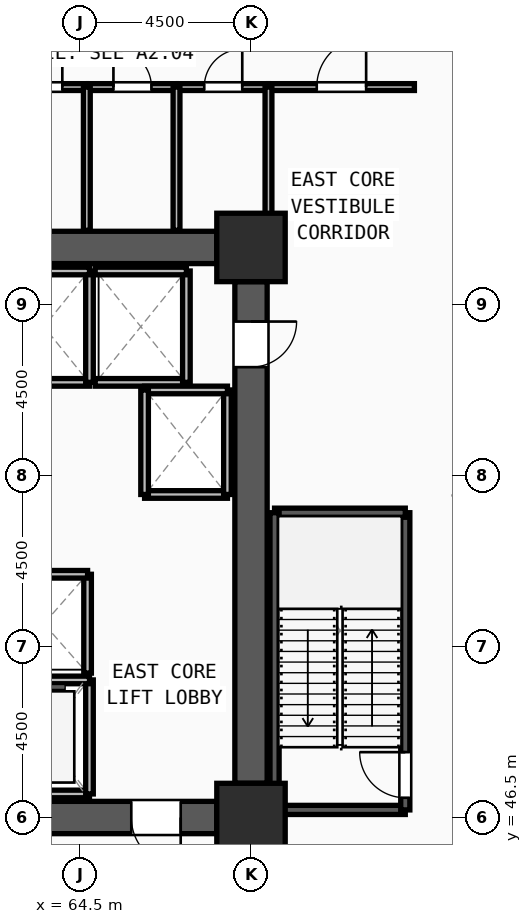
"""IFC4 building model, lengths in metres.
Left out: names, types, materials, properties, quantities, classifications, styles, units other than length and angle.
Written with IfcOpenShell. Run it as: python <this file> out.ifc"""

import sys

from ifc_helpers import new_model, si_unit, direction, frame, frame_2d, origin, origin_2d, place, context, subcontext, project, spatial, rectangle, extrude, source, transform, mapped, element, fill, save


model = new_model("IFC4")
c1 = context("Model", 3, precision=1e-05, world=origin(), true_north=direction((0.0, 1.0)))
c2 = subcontext(c1, "Body", "Model", "MODEL_VIEW")
j1 = project(units=[si_unit("LENGTHUNIT", "METRE"), si_unit("PLANEANGLEUNIT", "RADIAN")], contexts=[c1])
p1 = place(None, origin())
s1 = spatial("IfcSite", under=j1, at=p1, CompositionType="ELEMENT")
p2 = place(p1, origin())
s2 = spatial("IfcBuilding", under=s1, at=p2, CompositionType="ELEMENT")
p3 = place(p2, frame((0.0, 0.0, 9.9)))
s3 = spatial("IfcBuildingStorey", under=s2, at=p3, CompositionType="ELEMENT", Elevation=9.9)
m1 = source(origin(), c2, "Body", "SweptSolid", [
    extrude(rectangle(XDim=1.8, YDim=1.8, at=origin_2d()), origin(), (0.0, 0.0, 1.0), 4.5),
])
for number, where, z_axis, x_axis in (
    (1, (69.0, 46.5, 0.0), (0.0, 0.0, 1.0), (1.0, 0.0, 0.0)),
    (2, (69.0, 61.5, 0.0), (0.0, 0.0, 1.0), (1.0, 0.0, 0.0)),
):
    element("IfcColumn", number, at=place(p3, frame(where, z_axis=z_axis, x_axis=x_axis)), inside=s3, PredefinedType="COLUMN", context=c2, shape_type="MappedRepresentation", body=[
        mapped(m1, transform((0.0, 0.0, 0.0), x_axis=(1.0, 0.0, 0.0), y_axis=(0.0, 1.0, 0.0), z_axis=(0.0, 0.0, 1.0), scale=1.0)),
    ])
p4 = place(p3, frame((60.9, 61.5, 0.0), z_axis=(0.0, 0.0, 1.0), x_axis=(1.0, 0.0, 0.0)))
e3 = element("IfcWall", 3, at=p4, inside=s3, PredefinedType="SHEAR", context=c2, shape_type="SweptSolid", body=[
    extrude(rectangle(XDim=7.2, YDim=0.85, at=frame_2d((3.6, 0.0))), origin(), (0.0, 0.0, 1.0), 4.25),
])
p5 = place(p3, frame((69.0, 60.6, 0.0), z_axis=(0.0, 0.0, 1.0), x_axis=(0.0, -1.0, 0.0)))
e4 = element("IfcWall", 4, at=p5, inside=s3, PredefinedType="SHEAR", context=c2, shape_type="SweptSolid", body=[
    extrude(rectangle(XDim=13.2, YDim=0.85, at=frame_2d((6.6, 0.0))), origin(), (0.0, 0.0, 1.0), 4.25),
])
m2 = source(origin(), c2, "Body", "SweptSolid", [
    extrude(rectangle(XDim=1.2, YDim=2.2, at=frame_2d((0.6, 1.1))), frame((0.0, 0.435, 0.0), z_axis=(0.0, -1.0, 0.0), x_axis=(1.0, 0.0, 0.0)), (0.0, 0.0, 1.0), 0.87),
])
p6 = place(p5, frame((1.05, 0.0, 0.0)))
e5 = element("IfcOpeningElement", 5, at=p6, cuts=e4, PredefinedType="OPENING", context=c2, shape_type="MappedRepresentation", body=[
    mapped(m2, transform((0.0, 0.0, 0.0), x_axis=(1.0, 0.0, 0.0), y_axis=(0.0, 1.0, 0.0), z_axis=(0.0, 0.0, 1.0), scale=1.0)),
])
p7 = place(p3, frame((68.1, 46.5, 0.0), z_axis=(0.0, 0.0, 1.0), x_axis=(-1.0, 0.0, 0.0)))
e6 = element("IfcWall", 6, at=p7, inside=s3, PredefinedType="SHEAR", context=c2, shape_type="SweptSolid", body=[
    extrude(rectangle(XDim=7.2, YDim=0.85, at=frame_2d((3.6, 0.0))), origin(), (0.0, 0.0, 1.0), 4.25),
])
m3 = source(origin(), c2, "Body", "SweptSolid", [
    extrude(rectangle(XDim=1.3, YDim=2.2, at=frame_2d((0.65, 1.1))), frame((0.0, 0.435, 0.0), z_axis=(0.0, -1.0, 0.0), x_axis=(1.0, 0.0, 0.0)), (0.0, 0.0, 1.0), 0.87),
])
p8 = place(p7, frame((0.95, 0.0, 0.0)))
e7 = element("IfcOpeningElement", 7, at=p8, cuts=e6, PredefinedType="OPENING", context=c2, shape_type="MappedRepresentation", body=[
    mapped(m3, transform((0.0, 0.0, 0.0), x_axis=(1.0, 0.0, 0.0), y_axis=(0.0, 1.0, 0.0), z_axis=(0.0, 0.0, 1.0), scale=1.0)),
])
p9 = place(p3, frame((69.62, 46.7, 0.0), z_axis=(0.0, 0.0, 1.0), x_axis=(1.0, 0.0, 0.0)))
e8 = element("IfcWall", 8, at=p9, inside=s3, PredefinedType="SOLIDWALL", context=c2, shape_type="SweptSolid", body=[
    extrude(rectangle(XDim=3.44, YDim=0.24, at=frame_2d((1.72, 0.0))), origin(), (0.0, 0.0, 1.0), 4.25),
])
p10 = place(p3, frame((73.06, 46.7, 0.0), z_axis=(0.0, 0.0, 1.0), x_axis=(0.0, 1.0, 0.0)))
e9 = element("IfcWall", 9, at=p10, inside=s3, PredefinedType="SOLIDWALL", context=c2, shape_type="SweptSolid", body=[
    extrude(rectangle(XDim=7.82, YDim=0.24, at=frame_2d((3.91, 0.0))), origin(), (0.0, 0.0, 1.0), 4.25),
])
m4 = source(origin(), c2, "Body", "SweptSolid", [
    extrude(rectangle(XDim=1.2, YDim=2.2, at=frame_2d((0.6, 1.1))), frame((0.0, 0.13, 0.0), z_axis=(0.0, -1.0, 0.0), x_axis=(1.0, 0.0, 0.0)), (0.0, 0.0, 1.0), 0.26),
])
p11 = place(p10, frame((0.32, 0.0, 0.0)))
e10 = element("IfcOpeningElement", 10, at=p11, cuts=e9, PredefinedType="OPENING", context=c2, shape_type="MappedRepresentation", body=[
    mapped(m4, transform((0.0, 0.0, 0.0), x_axis=(1.0, 0.0, 0.0), y_axis=(0.0, 1.0, 0.0), z_axis=(0.0, 0.0, 1.0), scale=1.0)),
])
p12 = place(p3, frame((73.06, 54.52, 0.0), z_axis=(0.0, 0.0, 1.0), x_axis=(-1.0, 0.0, 0.0)))
e11 = element("IfcWall", 11, at=p12, inside=s3, PredefinedType="SOLIDWALL", context=c2, shape_type="SweptSolid", body=[
    extrude(rectangle(XDim=3.44, YDim=0.24, at=frame_2d((1.72, 0.0))), origin(), (0.0, 0.0, 1.0), 4.25),
])
p13 = place(p3, frame((69.62, 54.52, 0.0), z_axis=(0.0, 0.0, 1.0), x_axis=(0.0, -1.0, 0.0)))
e12 = element("IfcWall", 12, at=p13, inside=s3, PredefinedType="SOLIDWALL", context=c2, shape_type="SweptSolid", body=[
    extrude(rectangle(XDim=7.82, YDim=0.24, at=frame_2d((3.91, 0.0))), origin(), (0.0, 0.0, 1.0), 4.25),
])
p14 = place(p3, frame((62.35, 47.12, 0.0), z_axis=(0.0, 0.0, 1.0), x_axis=(1.0, 0.0, 0.0)))
e13 = element("IfcWall", 13, at=p14, inside=s3, PredefinedType="SOLIDWALL", context=c2, shape_type="SweptSolid", body=[
    extrude(rectangle(XDim=2.4, YDim=0.2, at=frame_2d((1.2, 0.0))), origin(), (0.0, 0.0, 1.0), 4.25),
])
p15 = place(p3, frame((64.75, 47.12, 0.0), z_axis=(0.0, 0.0, 1.0), x_axis=(0.0, 1.0, 0.0)))
e14 = element("IfcWall", 14, at=p15, inside=s3, PredefinedType="SOLIDWALL", context=c2, shape_type="SweptSolid", body=[
    extrude(rectangle(XDim=3.0, YDim=0.2, at=frame_2d((1.5, 0.0))), origin(), (0.0, 0.0, 1.0), 4.25),
])
for number, where, z_axis, x_axis in (
    (15, (64.75, 50.12, 0.0), (0.0, 0.0, 1.0), (-1.0, 0.0, 0.0)),
    (16, (62.35, 57.95, 0.0), (0.0, 0.0, 1.0), (1.0, 0.0, 0.0)),
):
    element("IfcWall", number, at=place(p3, frame(where, z_axis=z_axis, x_axis=x_axis)), inside=s3, PredefinedType="SOLIDWALL", context=c2, shape_type="SweptSolid", body=[
        extrude(rectangle(XDim=2.4, YDim=0.2, at=frame_2d((1.2, 0.0))), origin(), (0.0, 0.0, 1.0), 4.25),
    ])
p16 = place(p3, frame((64.75, 57.95, 0.0), z_axis=(0.0, 0.0, 1.0), x_axis=(0.0, 1.0, 0.0)))
e17 = element("IfcWall", 17, at=p16, inside=s3, PredefinedType="SOLIDWALL", context=c2, shape_type="SweptSolid", body=[
    extrude(rectangle(XDim=2.93, YDim=0.2, at=frame_2d((1.465, 0.0))), origin(), (0.0, 0.0, 1.0), 4.25),
])
p17 = place(p3, frame((64.75, 60.88, 0.0), z_axis=(0.0, 0.0, 1.0), x_axis=(-1.0, 0.0, 0.0)))
e18 = element("IfcWall", 18, at=p17, inside=s3, PredefinedType="SOLIDWALL", context=c2, shape_type="SweptSolid", body=[
    extrude(rectangle(XDim=2.4, YDim=0.2, at=frame_2d((1.2, 0.0))), origin(), (0.0, 0.0, 1.0), 4.25),
])
p18 = place(p3, frame((64.9, 57.95, 0.0), z_axis=(0.0, 0.0, 1.0), x_axis=(1.0, 0.0, 0.0)))
e19 = element("IfcWall", 19, at=p18, inside=s3, PredefinedType="SOLIDWALL", context=c2, shape_type="SweptSolid", body=[
    extrude(rectangle(XDim=2.4, YDim=0.2, at=frame_2d((1.2, 0.0))), origin(), (0.0, 0.0, 1.0), 4.25),
])
p19 = place(p3, frame((67.3, 57.95, 0.0), z_axis=(0.0, 0.0, 1.0), x_axis=(0.0, 1.0, 0.0)))
e20 = element("IfcWall", 20, at=p19, inside=s3, PredefinedType="SOLIDWALL", context=c2, shape_type="SweptSolid", body=[
    extrude(rectangle(XDim=2.93, YDim=0.2, at=frame_2d((1.465, 0.0))), origin(), (0.0, 0.0, 1.0), 4.25),
])
p20 = place(p3, frame((67.3, 60.88, 0.0), z_axis=(0.0, 0.0, 1.0), x_axis=(-1.0, 0.0, 0.0)))
e21 = element("IfcWall", 21, at=p20, inside=s3, PredefinedType="SOLIDWALL", context=c2, shape_type="SweptSolid", body=[
    extrude(rectangle(XDim=2.4, YDim=0.2, at=frame_2d((1.2, 0.0))), origin(), (0.0, 0.0, 1.0), 4.25),
])
p21 = place(p3, frame((66.2, 55.0, 0.0), z_axis=(0.0, 0.0, 1.0), x_axis=(1.0, 0.0, 0.0)))
e22 = element("IfcWall", 22, at=p21, inside=s3, PredefinedType="SOLIDWALL", context=c2, shape_type="SweptSolid", body=[
    extrude(rectangle(XDim=2.18, YDim=0.2, at=frame_2d((1.09, 0.0))), origin(), (0.0, 0.0, 1.0), 4.25),
])
p22 = place(p3, frame((68.38, 55.0, 0.0), z_axis=(0.0, 0.0, 1.0), x_axis=(0.0, 1.0, 0.0)))
e23 = element("IfcWall", 23, at=p22, inside=s3, PredefinedType="SOLIDWALL", context=c2, shape_type="SweptSolid", body=[
    extrude(rectangle(XDim=2.75, YDim=0.2, at=frame_2d((1.375, 0.0))), origin(), (0.0, 0.0, 1.0), 4.25),
])
p23 = place(p3, frame((68.38, 57.75, 0.0), z_axis=(0.0, 0.0, 1.0), x_axis=(-1.0, 0.0, 0.0)))
e24 = element("IfcWall", 24, at=p23, inside=s3, PredefinedType="SOLIDWALL", context=c2, shape_type="SweptSolid", body=[
    extrude(rectangle(XDim=2.18, YDim=0.2, at=frame_2d((1.09, 0.0))), origin(), (0.0, 0.0, 1.0), 4.25),
])
p24 = place(p3, frame((66.2, 57.75, 0.0), z_axis=(0.0, 0.0, 1.0), x_axis=(0.0, -1.0, 0.0)))
e25 = element("IfcWall", 25, at=p24, inside=s3, PredefinedType="SOLIDWALL", context=c2, shape_type="SweptSolid", body=[
    extrude(rectangle(XDim=2.75, YDim=0.2, at=frame_2d((1.375, 0.0))), origin(), (0.0, 0.0, 1.0), 4.25),
])
p25 = place(p3, frame((64.7, 50.3, 0.0), z_axis=(0.0, 0.0, 1.0), x_axis=(0.0, 1.0, 0.0)))
e26 = element("IfcWall", 26, at=p25, inside=s3, PredefinedType="SOLIDWALL", context=c2, shape_type="SweptSolid", body=[
    extrude(rectangle(XDim=2.6, YDim=0.2, at=frame_2d((1.3, 0.0))), origin(), (0.0, 0.0, 1.0), 4.25),
])
p26 = place(p3, frame((64.7, 52.9, 0.0), z_axis=(0.0, 0.0, 1.0), x_axis=(-1.0, 0.0, 0.0)))
e27 = element("IfcWall", 27, at=p26, inside=s3, PredefinedType="SOLIDWALL", context=c2, shape_type="SweptSolid", body=[
    extrude(rectangle(XDim=2.3, YDim=0.2, at=frame_2d((1.15, 0.0))), origin(), (0.0, 0.0, 1.0), 4.25),
])
p27 = place(p3, frame((62.39, 65.72, 0.0), z_axis=(0.0, 0.0, 1.0), x_axis=(1.0, 0.0, 0.0)))
e28 = element("IfcWall", 28, at=p27, inside=s3, PredefinedType="PARTITIONING", context=c2, shape_type="SweptSolid", body=[
    extrude(rectangle(XDim=2.29, YDim=0.18, at=frame_2d((1.145, 0.0))), origin(), (0.0, 0.0, 1.0), 4.25),
])
m5 = source(origin(), c2, "Body", "SweptSolid", [
    extrude(rectangle(XDim=1.0, YDim=2.2, at=frame_2d((0.5, 1.1))), frame((0.0, 0.1, 0.0), z_axis=(0.0, -1.0, 0.0), x_axis=(1.0, 0.0, 0.0)), (0.0, 0.0, 1.0), 0.2),
])
p28 = place(p27, frame((0.645, 0.0, 0.0)))
e29 = element("IfcOpeningElement", 29, at=p28, cuts=e28, PredefinedType="OPENING", context=c2, shape_type="MappedRepresentation", body=[
    mapped(m5, transform((0.0, 0.0, 0.0), x_axis=(1.0, 0.0, 0.0), y_axis=(0.0, 1.0, 0.0), z_axis=(0.0, 0.0, 1.0), scale=1.0)),
])
p29 = place(p3, frame((64.72, 65.72, 0.0), z_axis=(0.0, 0.0, 1.0), x_axis=(1.0, 0.0, 0.0)))
e30 = element("IfcWall", 30, at=p29, inside=s3, PredefinedType="PARTITIONING", context=c2, shape_type="SweptSolid", body=[
    extrude(rectangle(XDim=2.32, YDim=0.18, at=frame_2d((1.16, 0.0))), origin(), (0.0, 0.0, 1.0), 4.25),
])
p30 = place(p29, frame((0.66, 0.0, 0.0)))
e31 = element("IfcOpeningElement", 31, at=p30, cuts=e30, PredefinedType="OPENING", context=c2, shape_type="MappedRepresentation", body=[
    mapped(m5, transform((0.0, 0.0, 0.0), x_axis=(1.0, 0.0, 0.0), y_axis=(0.0, 1.0, 0.0), z_axis=(0.0, 0.0, 1.0), scale=1.0)),
])
p31 = place(p3, frame((67.08, 65.72, 0.0), z_axis=(0.0, 0.0, 1.0), x_axis=(1.0, 0.0, 0.0)))
e32 = element("IfcWall", 32, at=p31, inside=s3, PredefinedType="PARTITIONING", context=c2, shape_type="SweptSolid", body=[
    extrude(rectangle(XDim=2.38, YDim=0.18, at=frame_2d((1.19, 0.0))), origin(), (0.0, 0.0, 1.0), 4.25),
])
p32 = place(p31, frame((0.69, 0.0, 0.0)))
e33 = element("IfcOpeningElement", 33, at=p32, cuts=e32, PredefinedType="OPENING", context=c2, shape_type="MappedRepresentation", body=[
    mapped(m5, transform((0.0, 0.0, 0.0), x_axis=(1.0, 0.0, 0.0), y_axis=(0.0, 1.0, 0.0), z_axis=(0.0, 0.0, 1.0), scale=1.0)),
])
p33 = place(p3, frame((69.46, 65.72, 0.0), z_axis=(0.0, 0.0, 1.0), x_axis=(1.0, 0.0, 0.0)))
e34 = element("IfcWall", 34, at=p33, inside=s3, PredefinedType="PARTITIONING", context=c2, shape_type="SweptSolid", body=[
    extrude(rectangle(XDim=3.84, YDim=0.18, at=frame_2d((1.92, 0.0))), origin(), (0.0, 0.0, 1.0), 4.25),
])
m6 = source(origin(), c2, "Body", "SweptSolid", [
    extrude(rectangle(XDim=1.3, YDim=2.2, at=frame_2d((0.65, 1.1))), frame((0.0, 0.1, 0.0), z_axis=(0.0, -1.0, 0.0), x_axis=(1.0, 0.0, 0.0)), (0.0, 0.0, 1.0), 0.2),
])
p34 = place(p33, frame((1.27, 0.0, 0.0)))
e35 = element("IfcOpeningElement", 35, at=p34, cuts=e34, PredefinedType="OPENING", context=c2, shape_type="MappedRepresentation", body=[
    mapped(m6, transform((0.0, 0.0, 0.0), x_axis=(1.0, 0.0, 0.0), y_axis=(0.0, 1.0, 0.0), z_axis=(0.0, 0.0, 1.0), scale=1.0)),
])
for number, where, z_axis, x_axis in (
    (36, (64.68, 61.95, 0.0), (0.0, 0.0, 1.0), (0.0, 1.0, 0.0)),
    (37, (67.04, 61.95, 0.0), (0.0, 0.0, 1.0), (0.0, 1.0, 0.0)),
    (38, (69.46, 61.95, 0.0), (0.0, 0.0, 1.0), (0.0, 1.0, 0.0)),
):
    element("IfcWall", number, at=place(p3, frame(where, z_axis=z_axis, x_axis=x_axis)), inside=s3, PredefinedType="PARTITIONING", context=c2, shape_type="SweptSolid", body=[
        extrude(rectangle(XDim=3.77, YDim=0.18, at=frame_2d((1.885, 0.0))), origin(), (0.0, 0.0, 1.0), 4.25),
    ])
m7 = source(origin(), c2, "Body", "SweptSolid", [
    extrude(rectangle(XDim=1.3, YDim=2.2, at=frame_2d((0.65, 1.1))), frame((0.0, 0.025, 0.0), z_axis=(0.0, -1.0, 0.0), x_axis=(1.0, 0.0, 0.0)), (0.0, 0.0, 1.0), 0.05),
])
p35 = place(p8, origin())
e39 = element("IfcDoor", 39, at=p35, inside=s3, OperationType="SINGLE_SWING_LEFT", PredefinedType="DOOR", context=c2, shape_type="MappedRepresentation", body=[
    mapped(m7, transform((0.0, 0.0, 0.0), x_axis=(1.0, 0.0, 0.0), y_axis=(0.0, 1.0, 0.0), z_axis=(0.0, 0.0, 1.0), scale=1.0)),
])
fill(e7, e39)
m8 = source(origin(), c2, "Body", "SweptSolid", [
    extrude(rectangle(XDim=1.2, YDim=2.2, at=frame_2d((0.6, 1.1))), frame((0.0, 0.025, 0.0), z_axis=(0.0, -1.0, 0.0), x_axis=(1.0, 0.0, 0.0)), (0.0, 0.0, 1.0), 0.05),
])
p36 = place(p6, origin())
e40 = element("IfcDoor", 40, at=p36, inside=s3, OperationType="SINGLE_SWING_LEFT", PredefinedType="DOOR", context=c2, shape_type="MappedRepresentation", body=[
    mapped(m8, transform((0.0, 0.0, 0.0), x_axis=(1.0, 0.0, 0.0), y_axis=(0.0, 1.0, 0.0), z_axis=(0.0, 0.0, 1.0), scale=1.0)),
])
fill(e5, e40)
p37 = place(p11, origin())
e41 = element("IfcDoor", 41, at=p37, inside=s3, OperationType="SINGLE_SWING_RIGHT", PredefinedType="DOOR", context=c2, shape_type="MappedRepresentation", body=[
    mapped(m8, transform((0.0, 0.0, 0.0), x_axis=(1.0, 0.0, 0.0), y_axis=(0.0, 1.0, 0.0), z_axis=(0.0, 0.0, 1.0), scale=1.0)),
])
fill(e10, e41)
m9 = source(origin(), c2, "Body", "SweptSolid", [
    extrude(rectangle(XDim=1.0, YDim=2.2, at=frame_2d((0.5, 1.1))), frame((0.0, 0.025, 0.0), z_axis=(0.0, -1.0, 0.0), x_axis=(1.0, 0.0, 0.0)), (0.0, 0.0, 1.0), 0.05),
])
p38 = place(p28, origin())
e42 = element("IfcDoor", 42, at=p38, inside=s3, OperationType="SINGLE_SWING_RIGHT", PredefinedType="DOOR", context=c2, shape_type="MappedRepresentation", body=[
    mapped(m9, transform((0.0, 0.0, 0.0), x_axis=(1.0, 0.0, 0.0), y_axis=(0.0, 1.0, 0.0), z_axis=(0.0, 0.0, 1.0), scale=1.0)),
])
fill(e29, e42)
p39 = place(p30, origin())
e43 = element("IfcDoor", 43, at=p39, inside=s3, OperationType="SINGLE_SWING_LEFT", PredefinedType="DOOR", context=c2, shape_type="MappedRepresentation", body=[
    mapped(m9, transform((0.0, 0.0, 0.0), x_axis=(1.0, 0.0, 0.0), y_axis=(0.0, 1.0, 0.0), z_axis=(0.0, 0.0, 1.0), scale=1.0)),
])
fill(e31, e43)
p40 = place(p32, origin())
e44 = element("IfcDoor", 44, at=p40, inside=s3, OperationType="SINGLE_SWING_RIGHT", PredefinedType="DOOR", context=c2, shape_type="MappedRepresentation", body=[
    mapped(m9, transform((0.0, 0.0, 0.0), x_axis=(1.0, 0.0, 0.0), y_axis=(0.0, 1.0, 0.0), z_axis=(0.0, 0.0, 1.0), scale=1.0)),
])
fill(e33, e44)
p41 = place(p34, origin())
e45 = element("IfcDoor", 45, at=p41, inside=s3, OperationType="SINGLE_SWING_RIGHT", PredefinedType="DOOR", context=c2, shape_type="MappedRepresentation", body=[
    mapped(m7, transform((0.0, 0.0, 0.0), x_axis=(1.0, 0.0, 0.0), y_axis=(0.0, 1.0, 0.0), z_axis=(0.0, 0.0, 1.0), scale=1.0)),
])
fill(e35, e45)
save(model, sys.argv[1])
